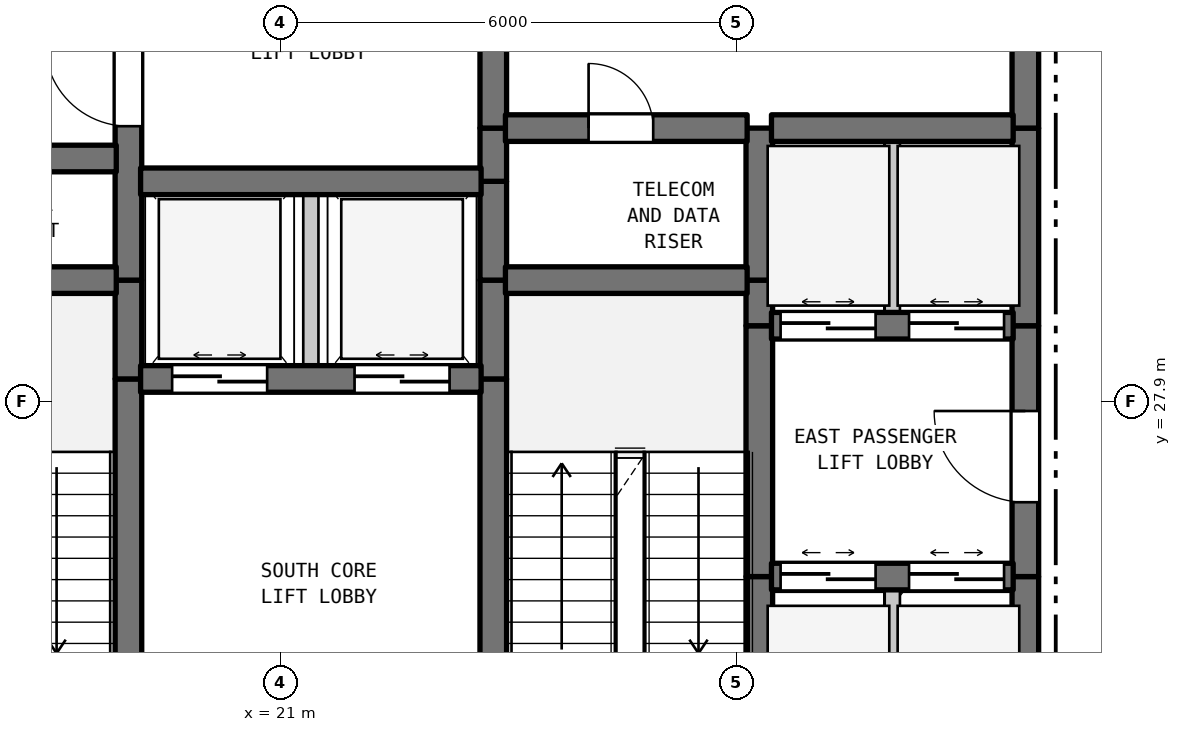
"""IFC4 building model, lengths in metres.
Left out: names, types, materials, properties, quantities, classifications, styles, units other than length and angle.
Written with IfcOpenShell. Run it as: python <this file> out.ifc"""

import sys

from ifc_helpers import new_model, si_unit, direction, frame, frame_2d, origin, place, context, subcontext, project, spatial, rectangle, extrude, element, fill, save


model = new_model("IFC4")
c1 = context("Model", 3, precision=1e-05, world=origin(), true_north=direction((0.0, 1.0)))
c2 = subcontext(c1, "Body", "Model", "MODEL_VIEW")
j1 = project(units=[si_unit("LENGTHUNIT", "METRE"), si_unit("PLANEANGLEUNIT", "RADIAN")], contexts=[c1])
p1 = place(None, origin())
s1 = spatial("IfcSite", under=j1, at=p1, CompositionType="ELEMENT")
p2 = place(p1, origin())
s2 = spatial("IfcBuilding", under=s1, at=p2, CompositionType="ELEMENT")
p3 = place(p2, frame((0.0, 0.0, 188.4)))
s3 = spatial("IfcBuildingStorey", under=s2, at=p3, CompositionType="ELEMENT", Elevation=188.4)
p4 = place(p3, frame((19.0, 22.7, 0.0), z_axis=(0.0, 0.0, 1.0), x_axis=(0.0, 1.0, 0.0)))
e1 = element("IfcWall", 1, at=p4, inside=s3, PredefinedType="SHEAR", context=c2, shape_type="SweptSolid", body=[
    extrude(rectangle(XDim=5.5, YDim=0.35, at=frame_2d((2.75, 0.0))), origin(), (0.0, 0.0, 1.0), 3.39),
])
p5 = place(p4, frame((0.631, 0.0, 0.0)))
e2 = element("IfcOpeningElement", 2, at=p5, cuts=e1, PredefinedType="OPENING", context=c2, shape_type="SweptSolid", body=[
    extrude(rectangle(XDim=1.1, YDim=2.15, at=frame_2d((0.55, 1.075))), frame((0.0, 0.185, 0.0), z_axis=(0.0, -1.0, 0.0), x_axis=(1.0, 0.0, 0.0)), (0.0, 0.0, 1.0), 0.37),
])
p6 = place(p3, frame((19.0, 28.2, 0.0), z_axis=(0.0, 0.0, 1.0), x_axis=(0.0, 1.0, 0.0)))
e3 = element("IfcWall", 3, at=p6, inside=s3, PredefinedType="SHEAR", context=c2, shape_type="SweptSolid", body=[
    extrude(rectangle(XDim=1.3, YDim=0.35, at=frame_2d((0.65, 0.0))), origin(), (0.0, 0.0, 1.0), 3.39),
])
p7 = place(p3, frame((19.0, 29.5, 0.0), z_axis=(0.0, 0.0, 1.0), x_axis=(0.0, 1.0, 0.0)))
e4 = element("IfcWall", 4, at=p7, inside=s3, PredefinedType="SHEAR", context=c2, shape_type="SweptSolid", body=[
    extrude(rectangle(XDim=5.5, YDim=0.35, at=frame_2d((2.75, 0.0))), origin(), (0.0, 0.0, 1.0), 3.39),
])
p8 = place(p7, frame((2.025, 0.0, 0.0)))
e5 = element("IfcOpeningElement", 5, at=p8, cuts=e4, PredefinedType="OPENING", context=c2, shape_type="SweptSolid", body=[
    extrude(rectangle(XDim=1.1, YDim=2.15, at=frame_2d((0.55, 1.075))), frame((0.0, 0.185, 0.0), z_axis=(0.0, -1.0, 0.0), x_axis=(1.0, 0.0, 0.0)), (0.0, 0.0, 1.0), 0.37),
])
p9 = place(p3, frame((21.4, 28.2, 0.0), z_axis=(0.0, 0.0, 1.0), x_axis=(0.0, 1.0, 0.0)))
e6 = element("IfcWall", 6, at=p9, inside=s3, PredefinedType="STANDARD", context=c2, shape_type="SweptSolid", body=[
    extrude(rectangle(XDim=2.6, YDim=0.2, at=frame_2d((1.3, 0.0))), origin(), (0.0, 0.0, 1.0), 3.39),
])
p10 = place(p3, frame((23.8, 22.7, 0.0), z_axis=(0.0, 0.0, 1.0), x_axis=(0.0, 1.0, 0.0)))
e7 = element("IfcWall", 7, at=p10, inside=s3, PredefinedType="SHEAR", context=c2, shape_type="SweptSolid", body=[
    extrude(rectangle(XDim=5.5, YDim=0.35, at=frame_2d((2.75, 0.0))), origin(), (0.0, 0.0, 1.0), 3.39),
])
p11 = place(p10, frame((0.235, 0.0, 0.0)))
e8 = element("IfcOpeningElement", 8, at=p11, cuts=e7, PredefinedType="OPENING", context=c2, shape_type="SweptSolid", body=[
    extrude(rectangle(XDim=1.1, YDim=2.15, at=frame_2d((0.55, 1.075))), frame((0.0, 0.185, 0.0), z_axis=(0.0, -1.0, 0.0), x_axis=(1.0, 0.0, 0.0)), (0.0, 0.0, 1.0), 0.37),
])
for number, where, z_axis, x_axis in (
    (9, (23.8, 28.2, 0.0), (0.0, 0.0, 1.0), (0.0, 1.0, 0.0)),
    (10, (23.8, 29.5, 0.0), (0.0, 0.0, 1.0), (0.0, 1.0, 0.0)),
):
    element("IfcWall", number, at=place(p3, frame(where, z_axis=z_axis, x_axis=x_axis)), inside=s3, PredefinedType="SHEAR", context=c2, shape_type="SweptSolid", body=[
        extrude(rectangle(XDim=1.3, YDim=0.35, at=frame_2d((0.65, 0.0))), origin(), (0.0, 0.0, 1.0), 3.39),
    ])
p12 = place(p3, frame((23.8, 30.8, 0.0), z_axis=(0.0, 0.0, 1.0), x_axis=(0.0, 1.0, 0.0)))
e11 = element("IfcWall", 11, at=p12, inside=s3, PredefinedType="SHEAR", context=c2, shape_type="SweptSolid", body=[
    extrude(rectangle(XDim=0.7, YDim=0.35, at=frame_2d((0.35, 0.0))), origin(), (0.0, 0.0, 1.0), 3.39),
])
p13 = place(p3, frame((23.8, 31.5, 0.0), z_axis=(0.0, 0.0, 1.0), x_axis=(0.0, 1.0, 0.0)))
e12 = element("IfcWall", 12, at=p13, inside=s3, PredefinedType="SHEAR", context=c2, shape_type="SweptSolid", body=[
    extrude(rectangle(XDim=3.5, YDim=0.35, at=frame_2d((1.75, 0.0))), origin(), (0.0, 0.0, 1.0), 3.39),
])
p14 = place(p13, frame((1.127, 0.0, 0.0)))
e13 = element("IfcOpeningElement", 13, at=p14, cuts=e12, PredefinedType="OPENING", context=c2, shape_type="SweptSolid", body=[
    extrude(rectangle(XDim=1.1, YDim=2.15, at=frame_2d((0.55, 1.075))), frame((0.0, 0.185, 0.0), z_axis=(0.0, -1.0, 0.0), x_axis=(1.0, 0.0, 0.0)), (0.0, 0.0, 1.0), 0.37),
])
p15 = place(p3, frame((27.3, 22.7, 0.0), z_axis=(0.0, 0.0, 1.0), x_axis=(0.0, 1.0, 0.0)))
e14 = element("IfcWall", 14, at=p15, inside=s3, PredefinedType="SHEAR", context=c2, shape_type="SweptSolid", body=[
    extrude(rectangle(XDim=2.9, YDim=0.35, at=frame_2d((1.45, 0.0))), origin(), (0.0, 0.0, 1.0), 3.39),
])
p16 = place(p3, frame((27.3, 25.6, 0.0), z_axis=(0.0, 0.0, 1.0), x_axis=(0.0, 1.0, 0.0)))
e15 = element("IfcWall", 15, at=p16, inside=s3, PredefinedType="SHEAR", context=c2, shape_type="SweptSolid", body=[
    extrude(rectangle(XDim=3.3, YDim=0.35, at=frame_2d((1.65, 0.0))), origin(), (0.0, 0.0, 1.0), 3.39),
])
p17 = place(p3, frame((27.3, 28.9, 0.0), z_axis=(0.0, 0.0, 1.0), x_axis=(0.0, 1.0, 0.0)))
e16 = element("IfcWall", 16, at=p17, inside=s3, PredefinedType="SHEAR", context=c2, shape_type="SweptSolid", body=[
    extrude(rectangle(XDim=0.6, YDim=0.35, at=frame_2d((0.3, 0.0))), origin(), (0.0, 0.0, 1.0), 3.39),
])
p18 = place(p3, frame((27.3, 29.5, 0.0), z_axis=(0.0, 0.0, 1.0), x_axis=(0.0, 1.0, 0.0)))
e17 = element("IfcWall", 17, at=p18, inside=s3, PredefinedType="SHEAR", context=c2, shape_type="SweptSolid", body=[
    extrude(rectangle(XDim=2.0, YDim=0.35, at=frame_2d((1.0, 0.0))), origin(), (0.0, 0.0, 1.0), 3.39),
])
p19 = place(p3, frame((29.05, 22.7, 0.0), z_axis=(0.0, 0.0, 1.0), x_axis=(0.0, 1.0, 0.0)))
e18 = element("IfcWall", 18, at=p19, inside=s3, PredefinedType="STANDARD", context=c2, shape_type="SweptSolid", body=[
    extrude(rectangle(XDim=2.9, YDim=0.2, at=frame_2d((1.45, 0.0))), origin(), (0.0, 0.0, 1.0), 3.39),
])
p20 = place(p3, frame((29.05, 28.9, 0.0), z_axis=(0.0, 0.0, 1.0), x_axis=(0.0, 1.0, 0.0)))
e19 = element("IfcWall", 19, at=p20, inside=s3, PredefinedType="STANDARD", context=c2, shape_type="SweptSolid", body=[
    extrude(rectangle(XDim=2.6, YDim=0.2, at=frame_2d((1.3, 0.0))), origin(), (0.0, 0.0, 1.0), 3.39),
])
p21 = place(p3, frame((30.8, 22.7, 0.0), z_axis=(0.0, 0.0, 1.0), x_axis=(0.0, 1.0, 0.0)))
e20 = element("IfcWall", 20, at=p21, inside=s3, PredefinedType="SHEAR", context=c2, shape_type="SweptSolid", body=[
    extrude(rectangle(XDim=2.9, YDim=0.35, at=frame_2d((1.45, 0.0))), origin(), (0.0, 0.0, 1.0), 3.39),
])
p22 = place(p3, frame((30.8, 25.6, 0.0), z_axis=(0.0, 0.0, 1.0), x_axis=(0.0, 1.0, 0.0)))
e21 = element("IfcWall", 21, at=p22, inside=s3, PredefinedType="SHEAR", context=c2, shape_type="SweptSolid", body=[
    extrude(rectangle(XDim=3.3, YDim=0.35, at=frame_2d((1.65, 0.0))), origin(), (0.0, 0.0, 1.0), 3.39),
])
p23 = place(p22, frame((0.978, 0.0, 0.0)))
e22 = element("IfcOpeningElement", 22, at=p23, cuts=e21, PredefinedType="OPENING", context=c2, shape_type="SweptSolid", body=[
    extrude(rectangle(XDim=1.2, YDim=2.2, at=frame_2d((0.6, 1.1))), frame((0.0, 0.185, 0.0), z_axis=(0.0, -1.0, 0.0), x_axis=(1.0, 0.0, 0.0)), (0.0, 0.0, 1.0), 0.37),
])
p24 = place(p3, frame((30.8, 28.9, 0.0), z_axis=(0.0, 0.0, 1.0), x_axis=(0.0, 1.0, 0.0)))
e23 = element("IfcWall", 23, at=p24, inside=s3, PredefinedType="SHEAR", context=c2, shape_type="SweptSolid", body=[
    extrude(rectangle(XDim=2.6, YDim=0.35, at=frame_2d((1.3, 0.0))), origin(), (0.0, 0.0, 1.0), 3.39),
])
p25 = place(p3, frame((30.8, 31.5, 0.0), z_axis=(0.0, 0.0, 1.0), x_axis=(0.0, 1.0, 0.0)))
e24 = element("IfcWall", 24, at=p25, inside=s3, PredefinedType="SHEAR", context=c2, shape_type="SweptSolid", body=[
    extrude(rectangle(XDim=3.5, YDim=0.35, at=frame_2d((1.75, 0.0))), origin(), (0.0, 0.0, 1.0), 3.39),
])
p26 = place(p25, frame((1.15, 0.0, 0.0)))
e25 = element("IfcOpeningElement", 25, at=p26, cuts=e24, PredefinedType="OPENING", context=c2, shape_type="SweptSolid", body=[
    extrude(rectangle(XDim=1.2, YDim=2.2, at=frame_2d((0.6, 1.1))), frame((0.0, 0.185, 0.0), z_axis=(0.0, -1.0, 0.0), x_axis=(1.0, 0.0, 0.0)), (0.0, 0.0, 1.0), 0.37),
])
p27 = place(p3, frame((27.46, 25.6, 0.0), z_axis=(0.0, 0.0, 1.0), x_axis=(1.0, 0.0, 0.0)))
e26 = element("IfcWall", 26, at=p27, inside=s3, PredefinedType="SHEAR", context=c2, shape_type="SweptSolid", body=[
    extrude(rectangle(XDim=3.18, YDim=0.35, at=frame_2d((1.59, 0.0))), origin(), (0.0, 0.0, 1.0), 3.39),
])
p28 = place(p27, frame((0.12, 0.0, 0.0)))
e27 = element("IfcOpeningElement", 27, at=p28, cuts=e26, PredefinedType="OPENING", context=c2, shape_type="SweptSolid", body=[
    extrude(rectangle(XDim=1.25, YDim=2.2, at=frame_2d((0.625, 1.1))), frame((0.0, 0.185, 0.0), z_axis=(0.0, -1.0, 0.0), x_axis=(1.0, 0.0, 0.0)), (0.0, 0.0, 1.0), 0.37),
])
p29 = place(p27, frame((1.81, 0.0, 0.0)))
e28 = element("IfcOpeningElement", 28, at=p29, cuts=e26, PredefinedType="OPENING", context=c2, shape_type="SweptSolid", body=[
    extrude(rectangle(XDim=1.25, YDim=2.2, at=frame_2d((0.625, 1.1))), frame((0.0, 0.185, 0.0), z_axis=(0.0, -1.0, 0.0), x_axis=(1.0, 0.0, 0.0)), (0.0, 0.0, 1.0), 0.37),
])
p30 = place(p3, frame((19.16, 28.2, 0.0), z_axis=(0.0, 0.0, 1.0), x_axis=(1.0, 0.0, 0.0)))
e29 = element("IfcWall", 29, at=p30, inside=s3, PredefinedType="SHEAR", context=c2, shape_type="SweptSolid", body=[
    extrude(rectangle(XDim=4.48, YDim=0.35, at=frame_2d((2.24, 0.0))), origin(), (0.0, 0.0, 1.0), 3.39),
])
p31 = place(p30, frame((0.415, 0.0, 0.0)))
e30 = element("IfcOpeningElement", 30, at=p31, cuts=e29, PredefinedType="OPENING", context=c2, shape_type="SweptSolid", body=[
    extrude(rectangle(XDim=1.25, YDim=2.2, at=frame_2d((0.625, 1.1))), frame((0.0, 0.185, 0.0), z_axis=(0.0, -1.0, 0.0), x_axis=(1.0, 0.0, 0.0)), (0.0, 0.0, 1.0), 0.37),
])
p32 = place(p30, frame((2.815, 0.0, 0.0)))
e31 = element("IfcOpeningElement", 31, at=p32, cuts=e29, PredefinedType="OPENING", context=c2, shape_type="SweptSolid", body=[
    extrude(rectangle(XDim=1.25, YDim=2.2, at=frame_2d((0.625, 1.1))), frame((0.0, 0.185, 0.0), z_axis=(0.0, -1.0, 0.0), x_axis=(1.0, 0.0, 0.0)), (0.0, 0.0, 1.0), 0.37),
])
p33 = place(p3, frame((27.46, 28.9, 0.0), z_axis=(0.0, 0.0, 1.0), x_axis=(1.0, 0.0, 0.0)))
e32 = element("IfcWall", 32, at=p33, inside=s3, PredefinedType="SHEAR", context=c2, shape_type="SweptSolid", body=[
    extrude(rectangle(XDim=3.18, YDim=0.35, at=frame_2d((1.59, 0.0))), origin(), (0.0, 0.0, 1.0), 3.39),
])
p34 = place(p33, frame((0.12, 0.0, 0.0)))
e33 = element("IfcOpeningElement", 33, at=p34, cuts=e32, PredefinedType="OPENING", context=c2, shape_type="SweptSolid", body=[
    extrude(rectangle(XDim=1.25, YDim=2.2, at=frame_2d((0.625, 1.1))), frame((0.0, 0.185, 0.0), z_axis=(0.0, -1.0, 0.0), x_axis=(1.0, 0.0, 0.0)), (0.0, 0.0, 1.0), 0.37),
])
p35 = place(p33, frame((1.81, 0.0, 0.0)))
e34 = element("IfcOpeningElement", 34, at=p35, cuts=e32, PredefinedType="OPENING", context=c2, shape_type="SweptSolid", body=[
    extrude(rectangle(XDim=1.25, YDim=2.2, at=frame_2d((0.625, 1.1))), frame((0.0, 0.185, 0.0), z_axis=(0.0, -1.0, 0.0), x_axis=(1.0, 0.0, 0.0)), (0.0, 0.0, 1.0), 0.37),
])
p36 = place(p3, frame((15.16, 29.5, 0.0), z_axis=(0.0, 0.0, 1.0), x_axis=(1.0, 0.0, 0.0)))
e35 = element("IfcWall", 35, at=p36, inside=s3, PredefinedType="SHEAR", context=c2, shape_type="SweptSolid", body=[
    extrude(rectangle(XDim=3.68, YDim=0.35, at=frame_2d((1.84, 0.0))), origin(), (0.0, 0.0, 1.0), 3.39),
])
p37 = place(p3, frame((23.96, 29.5, 0.0), z_axis=(0.0, 0.0, 1.0), x_axis=(1.0, 0.0, 0.0)))
e36 = element("IfcWall", 36, at=p37, inside=s3, PredefinedType="SHEAR", context=c2, shape_type="SweptSolid", body=[
    extrude(rectangle(XDim=3.18, YDim=0.35, at=frame_2d((1.59, 0.0))), origin(), (0.0, 0.0, 1.0), 3.39),
])
p38 = place(p3, frame((19.16, 30.8, 0.0), z_axis=(0.0, 0.0, 1.0), x_axis=(1.0, 0.0, 0.0)))
e37 = element("IfcWall", 37, at=p38, inside=s3, PredefinedType="SHEAR", context=c2, shape_type="SweptSolid", body=[
    extrude(rectangle(XDim=4.48, YDim=0.35, at=frame_2d((2.24, 0.0))), origin(), (0.0, 0.0, 1.0), 3.39),
])
p39 = place(p3, frame((15.16, 31.1, 0.0), z_axis=(0.0, 0.0, 1.0), x_axis=(1.0, 0.0, 0.0)))
e38 = element("IfcWall", 38, at=p39, inside=s3, PredefinedType="SHEAR", context=c2, shape_type="SweptSolid", body=[
    extrude(rectangle(XDim=3.68, YDim=0.35, at=frame_2d((1.84, 0.0))), origin(), (0.0, 0.0, 1.0), 3.39),
])
p40 = place(p3, frame((23.96, 31.5, 0.0), z_axis=(0.0, 0.0, 1.0), x_axis=(1.0, 0.0, 0.0)))
e39 = element("IfcWall", 39, at=p40, inside=s3, PredefinedType="SHEAR", context=c2, shape_type="SweptSolid", body=[
    extrude(rectangle(XDim=3.18, YDim=0.35, at=frame_2d((1.59, 0.0))), origin(), (0.0, 0.0, 1.0), 3.39),
])
p41 = place(p40, frame((1.094, 0.0, 0.0)))
e40 = element("IfcOpeningElement", 40, at=p41, cuts=e39, PredefinedType="OPENING", context=c2, shape_type="SweptSolid", body=[
    extrude(rectangle(XDim=0.85, YDim=2.1, at=frame_2d((0.425, 1.05))), frame((0.0, 0.185, 0.0), z_axis=(0.0, -1.0, 0.0), x_axis=(1.0, 0.0, 0.0)), (0.0, 0.0, 1.0), 0.37),
])
p42 = place(p3, frame((27.46, 31.5, 0.0), z_axis=(0.0, 0.0, 1.0), x_axis=(1.0, 0.0, 0.0)))
e41 = element("IfcWall", 41, at=p42, inside=s3, PredefinedType="SHEAR", context=c2, shape_type="SweptSolid", body=[
    extrude(rectangle(XDim=3.18, YDim=0.35, at=frame_2d((1.59, 0.0))), origin(), (0.0, 0.0, 1.0), 3.39),
])
p43 = place(p8, origin())
e42 = element("IfcDoor", 42, at=p43, inside=s3, OperationType="SINGLE_SWING_RIGHT", PredefinedType="DOOR", context=c2, shape_type="SweptSolid", body=[
    extrude(rectangle(XDim=1.1, YDim=2.15, at=frame_2d((0.55, 1.075))), frame((0.0, 0.025, 0.0), z_axis=(0.0, -1.0, 0.0), x_axis=(1.0, 0.0, 0.0)), (0.0, 0.0, 1.0), 0.05),
])
fill(e5, e42)
p44 = place(p23, origin())
e43 = element("IfcDoor", 43, at=p44, inside=s3, OperationType="SINGLE_SWING_RIGHT", PredefinedType="DOOR", context=c2, shape_type="SweptSolid", body=[
    extrude(rectangle(XDim=1.2, YDim=2.2, at=frame_2d((0.6, 1.1))), frame((0.0, 0.025, 0.0), z_axis=(0.0, -1.0, 0.0), x_axis=(1.0, 0.0, 0.0)), (0.0, 0.0, 1.0), 0.05),
])
fill(e22, e43)
p45 = place(p28, origin())
e44 = element("IfcDoor", 44, at=p45, inside=s3, OperationType="DOUBLE_DOOR_SLIDING", PredefinedType="DOOR", context=c2, shape_type="SweptSolid", body=[
    extrude(rectangle(XDim=1.25, YDim=2.2, at=frame_2d((0.625, 1.1))), frame((0.0, 0.025, 0.0), z_axis=(0.0, -1.0, 0.0), x_axis=(1.0, 0.0, 0.0)), (0.0, 0.0, 1.0), 0.05),
])
fill(e27, e44)
p46 = place(p29, origin())
e45 = element("IfcDoor", 45, at=p46, inside=s3, OperationType="DOUBLE_DOOR_SLIDING", PredefinedType="DOOR", context=c2, shape_type="SweptSolid", body=[
    extrude(rectangle(XDim=1.25, YDim=2.2, at=frame_2d((0.625, 1.1))), frame((0.0, 0.025, 0.0), z_axis=(0.0, -1.0, 0.0), x_axis=(1.0, 0.0, 0.0)), (0.0, 0.0, 1.0), 0.05),
])
fill(e28, e45)
p47 = place(p31, origin())
e46 = element("IfcDoor", 46, at=p47, inside=s3, OperationType="DOUBLE_DOOR_SLIDING", PredefinedType="DOOR", context=c2, shape_type="SweptSolid", body=[
    extrude(rectangle(XDim=1.25, YDim=2.2, at=frame_2d((0.625, 1.1))), frame((0.0, 0.025, 0.0), z_axis=(0.0, -1.0, 0.0), x_axis=(1.0, 0.0, 0.0)), (0.0, 0.0, 1.0), 0.05),
])
fill(e30, e46)
p48 = place(p32, origin())
e47 = element("IfcDoor", 47, at=p48, inside=s3, OperationType="DOUBLE_DOOR_SLIDING", PredefinedType="DOOR", context=c2, shape_type="SweptSolid", body=[
    extrude(rectangle(XDim=1.25, YDim=2.2, at=frame_2d((0.625, 1.1))), frame((0.0, 0.025, 0.0), z_axis=(0.0, -1.0, 0.0), x_axis=(1.0, 0.0, 0.0)), (0.0, 0.0, 1.0), 0.05),
])
fill(e31, e47)
p49 = place(p34, origin())
e48 = element("IfcDoor", 48, at=p49, inside=s3, OperationType="DOUBLE_DOOR_SLIDING", PredefinedType="DOOR", context=c2, shape_type="SweptSolid", body=[
    extrude(rectangle(XDim=1.25, YDim=2.2, at=frame_2d((0.625, 1.1))), frame((0.0, 0.025, 0.0), z_axis=(0.0, -1.0, 0.0), x_axis=(1.0, 0.0, 0.0)), (0.0, 0.0, 1.0), 0.05),
])
fill(e33, e48)
p50 = place(p35, origin())
e49 = element("IfcDoor", 49, at=p50, inside=s3, OperationType="DOUBLE_DOOR_SLIDING", PredefinedType="DOOR", context=c2, shape_type="SweptSolid", body=[
    extrude(rectangle(XDim=1.25, YDim=2.2, at=frame_2d((0.625, 1.1))), frame((0.0, 0.025, 0.0), z_axis=(0.0, -1.0, 0.0), x_axis=(1.0, 0.0, 0.0)), (0.0, 0.0, 1.0), 0.05),
])
fill(e34, e49)
p51 = place(p41, origin())
e50 = element("IfcDoor", 50, at=p51, inside=s3, OperationType="SINGLE_SWING_LEFT", PredefinedType="DOOR", context=c2, shape_type="SweptSolid", body=[
    extrude(rectangle(XDim=0.85, YDim=2.1, at=frame_2d((0.425, 1.05))), frame((0.0, 0.025, 0.0), z_axis=(0.0, -1.0, 0.0), x_axis=(1.0, 0.0, 0.0)), (0.0, 0.0, 1.0), 0.05),
])
fill(e40, e50)
save(model, sys.argv[1])
